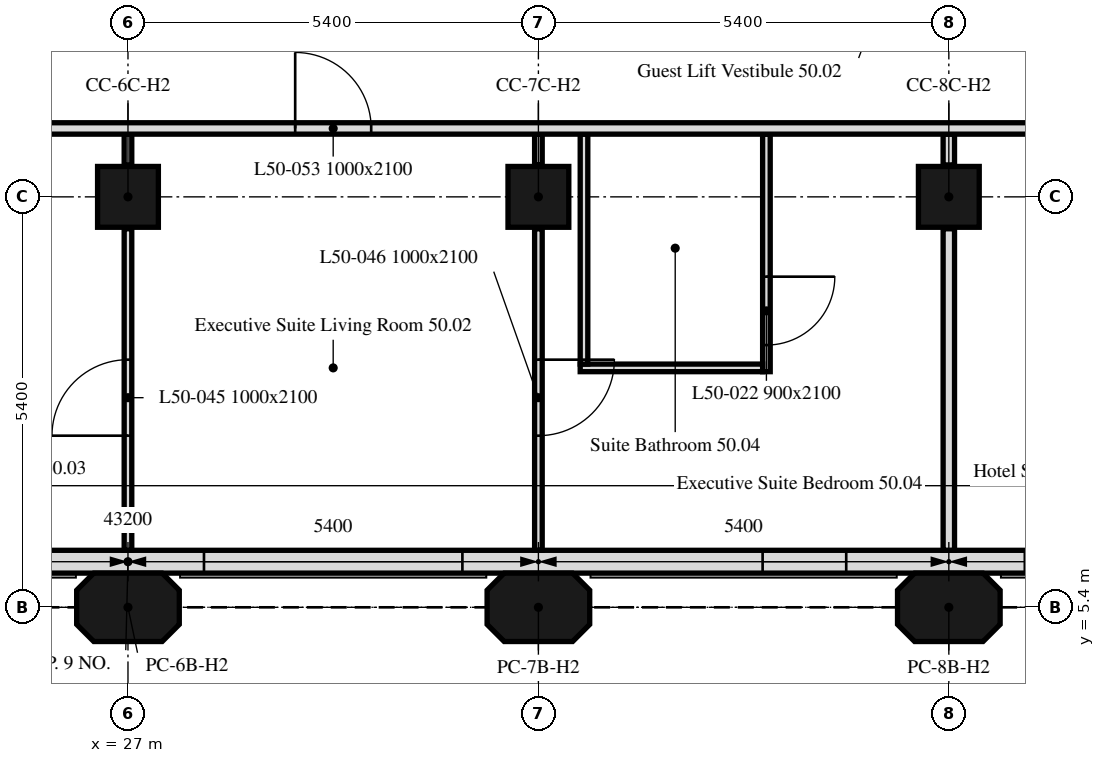
"""IFC4 building model, lengths in metres.
Left out: names, types, materials, properties, quantities, classifications, styles, units other than length and angle.
Written with IfcOpenShell. Run it as: python <this file> out.ifc"""

import sys

from ifc_helpers import new_model, si_unit, direction, frame, frame_2d, origin, origin_2d, place, context, subcontext, project, spatial, polyline, rectangle, outline, extrude, element, fill, save


model = new_model("IFC4")
c1 = context("Model", 3, precision=1e-05, world=origin(), true_north=direction((0.0, 1.0)))
c2 = subcontext(c1, "Body", "Model", "MODEL_VIEW")
j1 = project(units=[si_unit("LENGTHUNIT", "METRE"), si_unit("PLANEANGLEUNIT", "RADIAN")], contexts=[c1])
p1 = place(None, origin())
s1 = spatial("IfcSite", under=j1, at=p1, CompositionType="ELEMENT")
p2 = place(p1, origin())
s2 = spatial("IfcBuilding", under=s1, at=p2, CompositionType="ELEMENT")
p3 = place(p2, frame((0.0, 0.0, 203.8)))
s3 = spatial("IfcBuildingStorey", under=s2, at=p3, CompositionType="ELEMENT", Elevation=203.8)
for number, where, z_axis, x_axis in (
    (1, (27.0, 5.4, 0.0), (0.0, 0.0, 1.0), (1.0, 0.0, 0.0)),
    (2, (32.4, 5.4, 0.0), (0.0, 0.0, 1.0), (1.0, 0.0, 0.0)),
    (3, (37.8, 5.4, 0.0), (0.0, 0.0, 1.0), (1.0, 0.0, 0.0)),
):
    element("IfcColumn", number, at=place(p3, frame(where, z_axis=z_axis, x_axis=x_axis)), inside=s3, PredefinedType="COLUMN", context=c2, shape_type="SweptSolid", body=[
        extrude(outline(polyline([(-0.45, -0.45), (0.45, -0.45), (0.675, -0.225), (0.675, 0.225), (0.45, 0.45), (-0.45, 0.45), (-0.675, 0.225), (-0.675, -0.225), (-0.45, -0.45)])), origin(), (0.0, 0.0, 1.0), 3.0),
    ])
for number, where, z_axis, x_axis in (
    (4, (27.0, 10.8, 0.0), (0.0, 0.0, 1.0), (1.0, 0.0, 0.0)),
    (5, (32.4, 10.8, 0.0), (0.0, 0.0, 1.0), (1.0, 0.0, 0.0)),
    (6, (37.8, 10.8, 0.0), (0.0, 0.0, 1.0), (1.0, 0.0, 0.0)),
):
    element("IfcColumn", number, at=place(p3, frame(where, z_axis=z_axis, x_axis=x_axis)), inside=s3, PredefinedType="COLUMN", context=c2, shape_type="SweptSolid", body=[
        extrude(rectangle(XDim=0.8, YDim=0.8, at=origin_2d()), origin(), (0.0, 0.0, 1.0), 3.0),
    ])
p4 = place(p3, frame((10.986, 6.0, 0.0), z_axis=(0.0, 0.0, 1.0), x_axis=(1.0, 0.0, 0.0)))
e7 = element("IfcWall", 7, at=p4, inside=s3, PredefinedType="SOLIDWALL", context=c2, shape_type="SweptSolid", body=[
    extrude(rectangle(XDim=32.027, YDim=0.3, at=frame_2d((16.014, 0.0))), origin(), (0.0, 0.0, 1.0), 3.0),
])
p5 = place(p4, frame((2.764, 0.0, 0.9)))
e8 = element("IfcOpeningElement", 8, at=p5, cuts=e7, PredefinedType="OPENING", context=c2, shape_type="SweptSolid", body=[
    extrude(rectangle(XDim=1.1, YDim=1.7, at=frame_2d((0.55, 0.85))), frame((0.0, 0.16, 0.0), z_axis=(0.0, -1.0, 0.0), x_axis=(1.0, 0.0, 0.0)), (0.0, 0.0, 1.0), 0.32),
])
p6 = place(p4, frame((6.214, 0.0, 0.9)))
e9 = element("IfcOpeningElement", 9, at=p6, cuts=e7, PredefinedType="OPENING", context=c2, shape_type="SweptSolid", body=[
    extrude(rectangle(XDim=3.4, YDim=1.7, at=frame_2d((1.7, 0.85))), frame((0.0, 0.16, 0.0), z_axis=(0.0, -1.0, 0.0), x_axis=(1.0, 0.0, 0.0)), (0.0, 0.0, 1.0), 0.32),
])
p7 = place(p4, frame((13.564, 0.0, 0.9)))
e10 = element("IfcOpeningElement", 10, at=p7, cuts=e7, PredefinedType="OPENING", context=c2, shape_type="SweptSolid", body=[
    extrude(rectangle(XDim=1.1, YDim=1.7, at=frame_2d((0.55, 0.85))), frame((0.0, 0.16, 0.0), z_axis=(0.0, -1.0, 0.0), x_axis=(1.0, 0.0, 0.0)), (0.0, 0.0, 1.0), 0.32),
])
p8 = place(p4, frame((17.014, 0.0, 0.9)))
e11 = element("IfcOpeningElement", 11, at=p8, cuts=e7, PredefinedType="OPENING", context=c2, shape_type="SweptSolid", body=[
    extrude(rectangle(XDim=3.4, YDim=1.7, at=frame_2d((1.7, 0.85))), frame((0.0, 0.16, 0.0), z_axis=(0.0, -1.0, 0.0), x_axis=(1.0, 0.0, 0.0)), (0.0, 0.0, 1.0), 0.32),
])
p9 = place(p4, frame((24.364, 0.0, 0.9)))
e12 = element("IfcOpeningElement", 12, at=p9, cuts=e7, PredefinedType="OPENING", context=c2, shape_type="SweptSolid", body=[
    extrude(rectangle(XDim=1.1, YDim=1.7, at=frame_2d((0.55, 0.85))), frame((0.0, 0.16, 0.0), z_axis=(0.0, -1.0, 0.0), x_axis=(1.0, 0.0, 0.0)), (0.0, 0.0, 1.0), 0.32),
])
p10 = place(p4, frame((27.814, 0.0, 0.9)))
e13 = element("IfcOpeningElement", 13, at=p10, cuts=e7, PredefinedType="OPENING", context=c2, shape_type="SweptSolid", body=[
    extrude(rectangle(XDim=3.4, YDim=1.7, at=frame_2d((1.7, 0.85))), frame((0.0, 0.16, 0.0), z_axis=(0.0, -1.0, 0.0), x_axis=(1.0, 0.0, 0.0)), (0.0, 0.0, 1.0), 0.32),
])
p11 = place(p3, frame((27.0, 6.151, 0.0), z_axis=(0.0, 0.0, 1.0), x_axis=(0.0, 1.0, 0.0)))
e14 = element("IfcWall", 14, at=p11, inside=s3, PredefinedType="PARTITIONING", context=c2, shape_type="SweptSolid", body=[
    extrude(rectangle(XDim=4.229, YDim=0.1, at=frame_2d((2.115, 0.0))), origin(), (0.0, 0.0, 1.0), 3.0),
])
p12 = place(p11, frame((1.507, 0.0, 0.0)))
e15 = element("IfcOpeningElement", 15, at=p12, cuts=e14, PredefinedType="OPENING", context=c2, shape_type="SweptSolid", body=[
    extrude(rectangle(XDim=1.0, YDim=2.1, at=frame_2d((0.5, 1.05))), frame((0.0, 0.05, 0.0), z_axis=(0.0, -1.0, 0.0), x_axis=(1.0, 0.0, 0.0)), (0.0, 0.0, 1.0), 0.1),
])
p13 = place(p3, frame((27.0, 11.22, 0.0), z_axis=(0.0, 0.0, 1.0), x_axis=(0.0, 1.0, 0.0)))
e16 = element("IfcWall", 16, at=p13, inside=s3, PredefinedType="PARTITIONING", context=c2, shape_type="SweptSolid", body=[
    extrude(rectangle(XDim=0.405, YDim=0.1, at=frame_2d((0.203, 0.0))), origin(), (0.0, 0.0, 1.0), 3.0),
])
p14 = place(p3, frame((37.8, 6.151, 0.0), z_axis=(0.0, 0.0, 1.0), x_axis=(0.0, 1.0, 0.0)))
e17 = element("IfcWall", 17, at=p14, inside=s3, PredefinedType="PARTITIONING", context=c2, shape_type="SweptSolid", body=[
    extrude(rectangle(XDim=4.229, YDim=0.15, at=frame_2d((2.115, 0.0))), origin(), (0.0, 0.0, 1.0), 3.0),
])
p15 = place(p3, frame((37.8, 11.22, 0.0), z_axis=(0.0, 0.0, 1.0), x_axis=(0.0, 1.0, 0.0)))
e18 = element("IfcWall", 18, at=p15, inside=s3, PredefinedType="PARTITIONING", context=c2, shape_type="SweptSolid", body=[
    extrude(rectangle(XDim=0.405, YDim=0.15, at=frame_2d((0.203, 0.0))), origin(), (0.0, 0.0, 1.0), 3.0),
])
p16 = place(p3, frame((35.4, 11.625, 0.0), z_axis=(0.0, 0.0, 1.0), x_axis=(0.0, -1.0, 0.0)))
e19 = element("IfcWall", 19, at=p16, inside=s3, PredefinedType="PARTITIONING", context=c2, shape_type="SweptSolid", body=[
    extrude(rectangle(XDim=3.125, YDim=0.1, at=frame_2d((1.562, 0.0))), origin(), (0.0, 0.0, 1.0), 3.0),
])
p17 = place(p16, frame((1.875, 0.0, 0.0)))
e20 = element("IfcOpeningElement", 20, at=p17, cuts=e19, PredefinedType="OPENING", context=c2, shape_type="SweptSolid", body=[
    extrude(rectangle(XDim=0.9, YDim=2.1, at=frame_2d((0.45, 1.05))), frame((0.0, 0.05, 0.0), z_axis=(0.0, -1.0, 0.0), x_axis=(1.0, 0.0, 0.0)), (0.0, 0.0, 1.0), 0.1),
])
p18 = place(p3, frame((35.35, 8.55, 0.0), z_axis=(0.0, 0.0, 1.0), x_axis=(-1.0, 0.0, 0.0)))
e21 = element("IfcWall", 21, at=p18, inside=s3, PredefinedType="PARTITIONING", context=c2, shape_type="SweptSolid", body=[
    extrude(rectangle(XDim=2.4, YDim=0.1, at=frame_2d((1.2, 0.0))), origin(), (0.0, 0.0, 1.0), 3.0),
])
p19 = place(p3, frame((33.0, 8.6, 0.0), z_axis=(0.0, 0.0, 1.0), x_axis=(0.0, 1.0, 0.0)))
e22 = element("IfcWall", 22, at=p19, inside=s3, PredefinedType="PARTITIONING", context=c2, shape_type="SweptSolid", body=[
    extrude(rectangle(XDim=3.025, YDim=0.1, at=frame_2d((1.512, 0.0))), origin(), (0.0, 0.0, 1.0), 3.0),
])
p20 = place(p3, frame((32.4, 11.625, 0.0), z_axis=(0.0, 0.0, 1.0), x_axis=(0.0, -1.0, 0.0)))
e23 = element("IfcWall", 23, at=p20, inside=s3, PredefinedType="PARTITIONING", context=c2, shape_type="SweptSolid", body=[
    extrude(rectangle(XDim=0.405, YDim=0.1, at=frame_2d((0.203, 0.0))), origin(), (0.0, 0.0, 1.0), 3.0),
])
p21 = place(p3, frame((32.4, 10.38, 0.0), z_axis=(0.0, 0.0, 1.0), x_axis=(0.0, -1.0, 0.0)))
e24 = element("IfcWall", 24, at=p21, inside=s3, PredefinedType="PARTITIONING", context=c2, shape_type="SweptSolid", body=[
    extrude(rectangle(XDim=4.229, YDim=0.1, at=frame_2d((2.115, 0.0))), origin(), (0.0, 0.0, 1.0), 3.0),
])
p22 = place(p21, frame((1.722, 0.0, 0.0)))
e25 = element("IfcOpeningElement", 25, at=p22, cuts=e24, PredefinedType="OPENING", context=c2, shape_type="SweptSolid", body=[
    extrude(rectangle(XDim=1.0, YDim=2.1, at=frame_2d((0.5, 1.05))), frame((0.0, 0.05, 0.0), z_axis=(0.0, -1.0, 0.0), x_axis=(1.0, 0.0, 0.0)), (0.0, 0.0, 1.0), 0.1),
])
p23 = place(p3, frame((6.151, 11.7, 0.0), z_axis=(0.0, 0.0, 1.0), x_axis=(1.0, 0.0, 0.0)))
e26 = element("IfcWall", 26, at=p23, inside=s3, PredefinedType="PARTITIONING", context=c2, shape_type="SweptSolid", body=[
    extrude(rectangle(XDim=41.698, YDim=0.15, at=frame_2d((20.849, 0.0))), origin(), (0.0, 0.0, 1.0), 3.0),
])
p24 = place(p23, frame((37.954, 0.0, 0.0)))
e27 = element("IfcOpeningElement", 27, at=p24, cuts=e26, PredefinedType="OPENING", context=c2, shape_type="SweptSolid", body=[
    extrude(rectangle(XDim=1.0, YDim=2.1, at=frame_2d((0.5, 1.05))), frame((0.0, 0.075, 0.0), z_axis=(0.0, -1.0, 0.0), x_axis=(1.0, 0.0, 0.0)), (0.0, 0.0, 1.0), 0.15),
])
p25 = place(p23, frame((6.849, 0.0, 0.0)))
e28 = element("IfcOpeningElement", 28, at=p25, cuts=e26, PredefinedType="OPENING", context=c2, shape_type="SweptSolid", body=[
    extrude(rectangle(XDim=1.0, YDim=2.1, at=frame_2d((0.5, 1.05))), frame((0.0, 0.075, 0.0), z_axis=(0.0, -1.0, 0.0), x_axis=(1.0, 0.0, 0.0)), (0.0, 0.0, 1.0), 0.15),
])
p26 = place(p23, frame((23.049, 0.0, 0.0)))
e29 = element("IfcOpeningElement", 29, at=p26, cuts=e26, PredefinedType="OPENING", context=c2, shape_type="SweptSolid", body=[
    extrude(rectangle(XDim=1.0, YDim=2.1, at=frame_2d((0.5, 1.05))), frame((0.0, 0.075, 0.0), z_axis=(0.0, -1.0, 0.0), x_axis=(1.0, 0.0, 0.0)), (0.0, 0.0, 1.0), 0.15),
])
p27 = place(p8, origin())
e30 = element("IfcWindow", 30, at=p27, inside=s3, PartitioningType="SINGLE_PANEL", PredefinedType="WINDOW", context=c2, shape_type="SweptSolid", body=[
    extrude(rectangle(XDim=3.4, YDim=1.7, at=frame_2d((1.7, 0.85))), frame((0.0, 0.03, 0.0), z_axis=(0.0, -1.0, 0.0), x_axis=(1.0, 0.0, 0.0)), (0.0, 0.0, 1.0), 0.06),
])
fill(e11, e30)
p28 = place(p9, origin())
e31 = element("IfcWindow", 31, at=p28, inside=s3, PartitioningType="SINGLE_PANEL", PredefinedType="WINDOW", context=c2, shape_type="SweptSolid", body=[
    extrude(rectangle(XDim=1.1, YDim=1.7, at=frame_2d((0.55, 0.85))), frame((0.0, 0.03, 0.0), z_axis=(0.0, -1.0, 0.0), x_axis=(1.0, 0.0, 0.0)), (0.0, 0.0, 1.0), 0.06),
])
fill(e12, e31)
p29 = place(p17, origin())
e32 = element("IfcDoor", 32, at=p29, inside=s3, OperationType="SINGLE_SWING_RIGHT", PredefinedType="DOOR", context=c2, shape_type="SweptSolid", body=[
    extrude(rectangle(XDim=0.9, YDim=2.1, at=frame_2d((0.45, 1.05))), frame((0.0, 0.025, 0.0), z_axis=(0.0, -1.0, 0.0), x_axis=(1.0, 0.0, 0.0)), (0.0, 0.0, 1.0), 0.05),
])
fill(e20, e32)
p30 = place(p12, origin())
e33 = element("IfcDoor", 33, at=p30, inside=s3, OperationType="SINGLE_SWING_LEFT", PredefinedType="DOOR", context=c2, shape_type="SweptSolid", body=[
    extrude(rectangle(XDim=1.0, YDim=2.1, at=frame_2d((0.5, 1.05))), frame((0.0, 0.025, 0.0), z_axis=(0.0, -1.0, 0.0), x_axis=(1.0, 0.0, 0.0)), (0.0, 0.0, 1.0), 0.05),
])
fill(e15, e33)
p31 = place(p22, origin())
e34 = element("IfcDoor", 34, at=p31, inside=s3, OperationType="SINGLE_SWING_LEFT", PredefinedType="DOOR", context=c2, shape_type="SweptSolid", body=[
    extrude(rectangle(XDim=1.0, YDim=2.1, at=frame_2d((0.5, 1.05))), frame((0.0, 0.025, 0.0), z_axis=(0.0, -1.0, 0.0), x_axis=(1.0, 0.0, 0.0)), (0.0, 0.0, 1.0), 0.05),
])
fill(e25, e34)
p32 = place(p26, origin())
e35 = element("IfcDoor", 35, at=p32, inside=s3, OperationType="SINGLE_SWING_LEFT", PredefinedType="DOOR", context=c2, shape_type="SweptSolid", body=[
    extrude(rectangle(XDim=1.0, YDim=2.1, at=frame_2d((0.5, 1.05))), frame((0.0, 0.025, 0.0), z_axis=(0.0, -1.0, 0.0), x_axis=(1.0, 0.0, 0.0)), (0.0, 0.0, 1.0), 0.05),
])
fill(e29, e35)
save(model, sys.argv[1])
